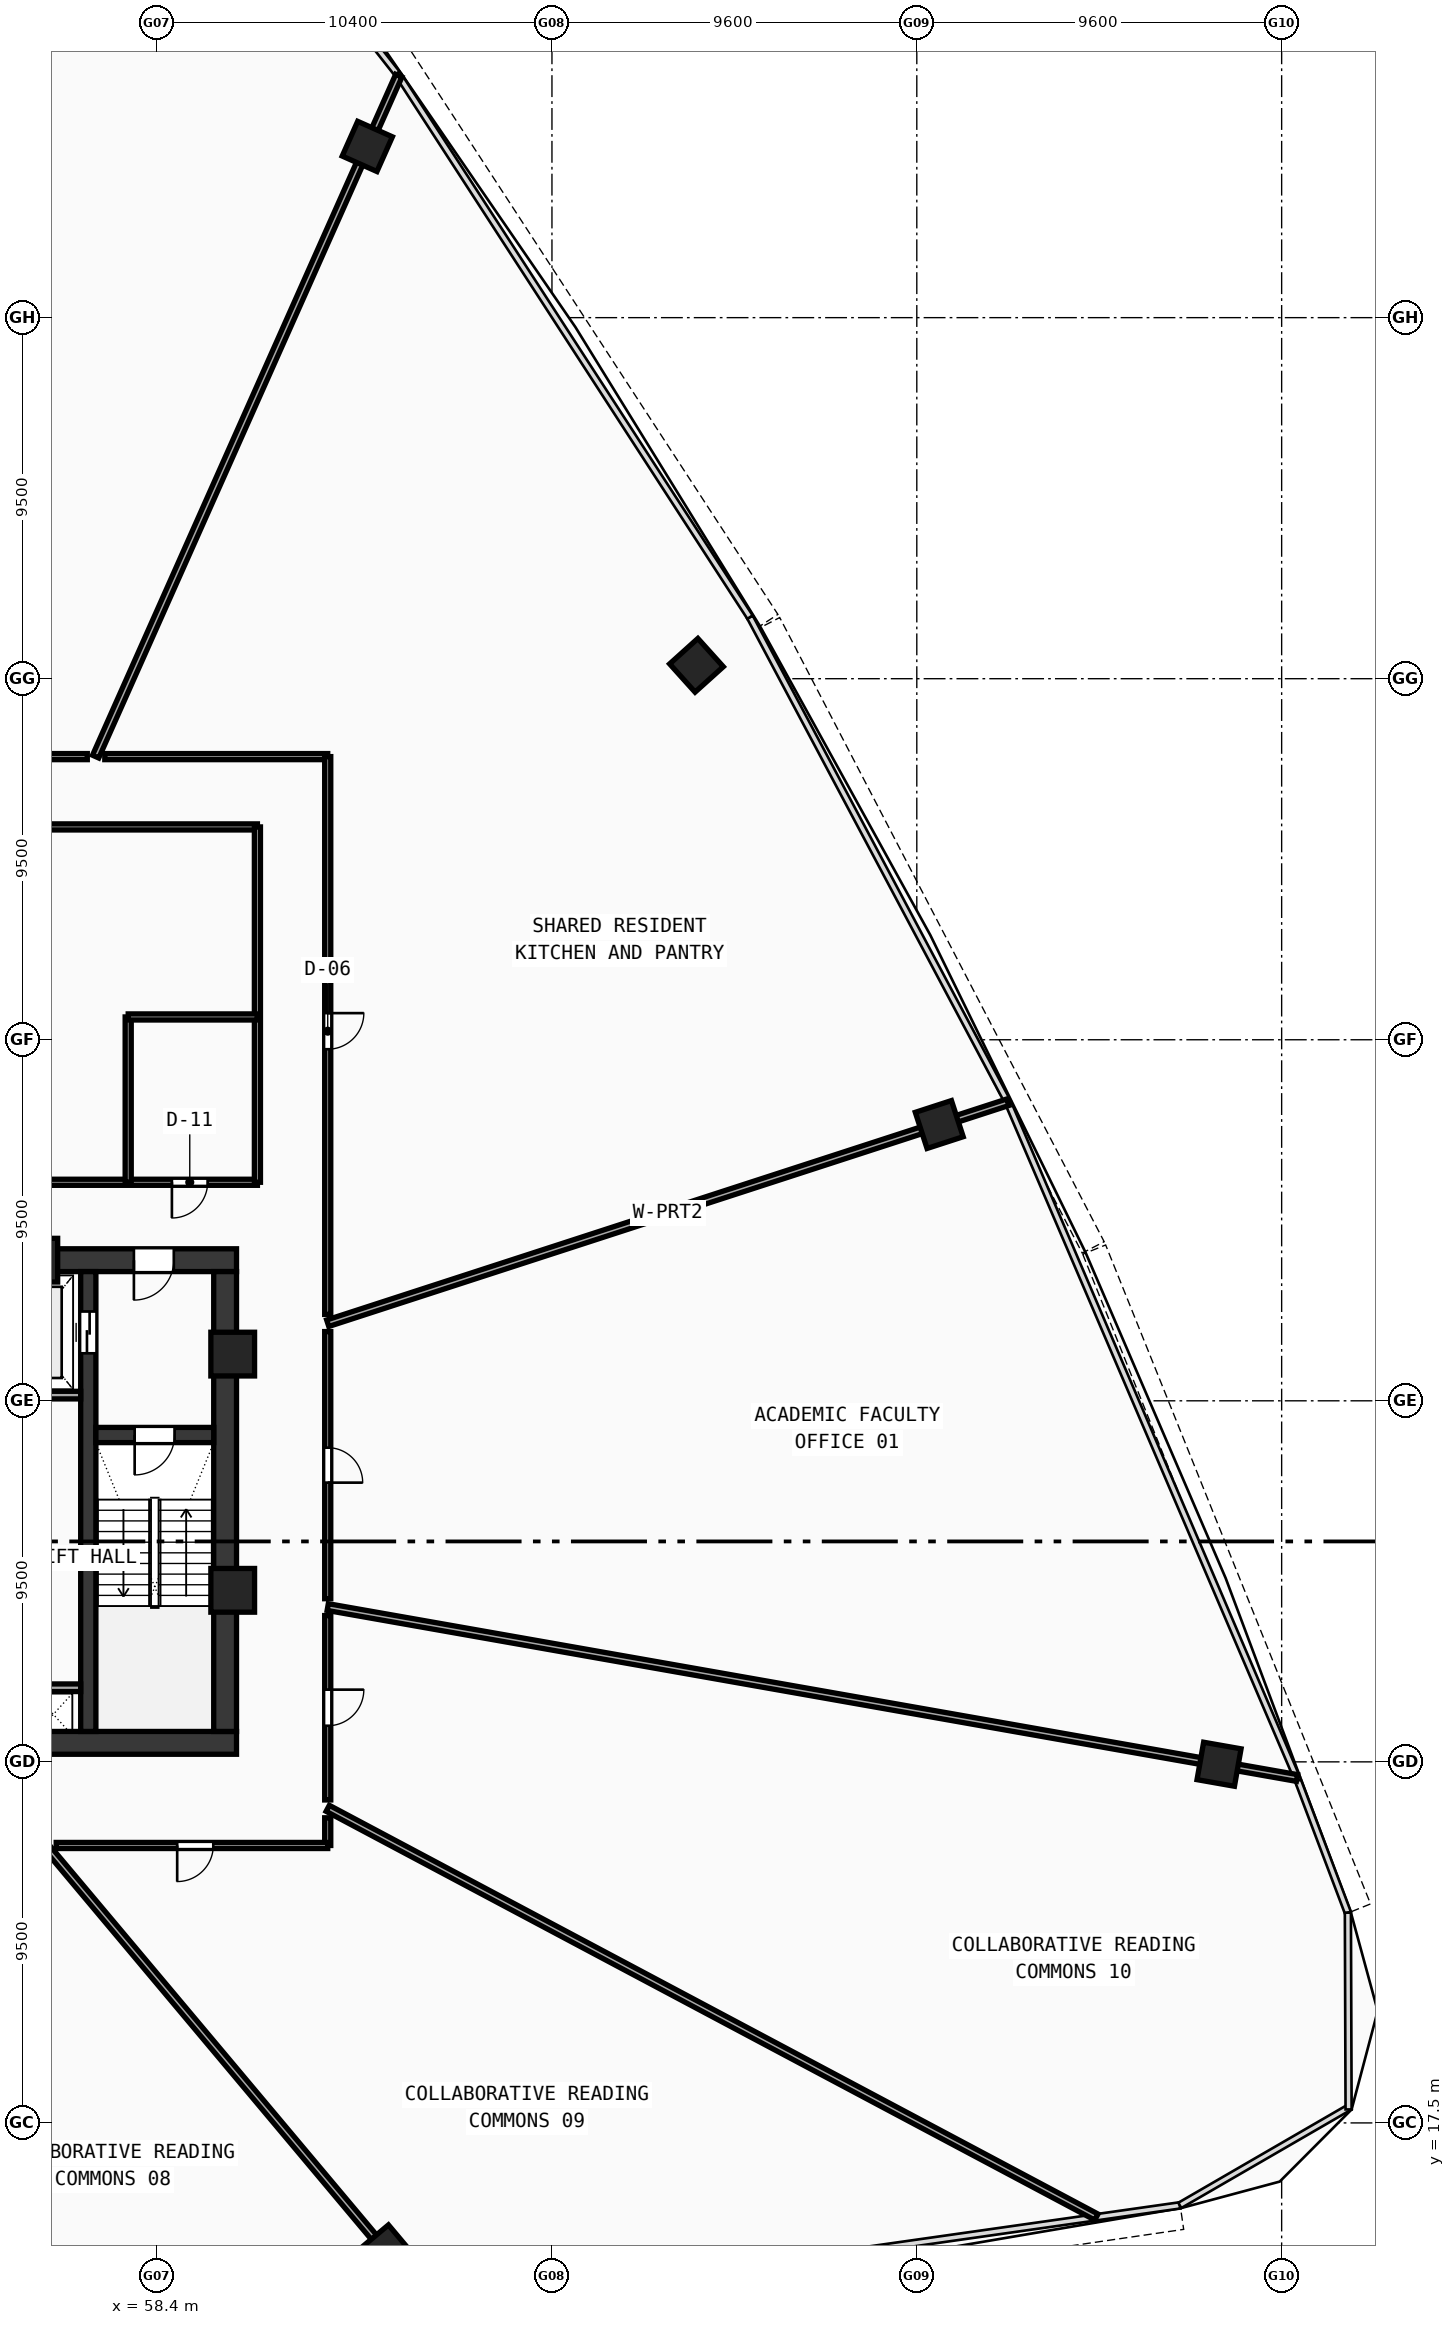
"""IFC4 building model, lengths in metres.
Left out: names, types, materials, properties, quantities, classifications, styles, units other than length and angle.
Written with IfcOpenShell. Run it as: python <this file> out.ifc"""

import sys

from ifc_helpers import new_model, si_unit, direction, frame, frame_2d, origin, origin_with_axes, origin_2d, place, context, subcontext, project, spatial, rectangle, hollow_rectangle, extrude, source, transform, mapped, element, fill, save


model = new_model("IFC4")
c1 = context("Model", 3, precision=1e-05, world=origin(), true_north=direction((0.0, 1.0)))
c2 = subcontext(c1, "Body", "Model", "MODEL_VIEW")
j1 = project(units=[si_unit("LENGTHUNIT", "METRE"), si_unit("PLANEANGLEUNIT", "RADIAN")], contexts=[c1])
p1 = place(None, origin())
s1 = spatial("IfcSite", under=j1, at=p1, CompositionType="ELEMENT")
p2 = place(p1, origin())
s2 = spatial("IfcBuilding", under=s1, at=p2, CompositionType="ELEMENT")
p3 = place(p2, frame((0.0, 0.0, 100.18)))
s3 = spatial("IfcBuildingStorey", under=s2, at=p3, CompositionType="ELEMENT", Elevation=100.18)
p4 = place(p3, frame((35.5, 27.5, 0.0), z_axis=(0.0, 0.0, 1.0), x_axis=(1.0, 0.0, 0.0)))
e1 = element("IfcWall", 1, at=p4, inside=s3, PredefinedType="SHEAR", context=c2, shape_type="SweptSolid", body=[
    extrude(rectangle(XDim=25.0, YDim=0.6, at=frame_2d((12.5, 0.0))), origin(), (0.0, 0.0, 1.0), 3.54),
])
p5 = place(p3, frame((49.2, 40.2, 0.0), z_axis=(0.0, 0.0, 1.0), x_axis=(1.0, 0.0, 0.0)))
e2 = element("IfcWall", 2, at=p5, inside=s3, PredefinedType="SHEAR", context=c2, shape_type="SweptSolid", body=[
    extrude(rectangle(XDim=11.3, YDim=0.6, at=frame_2d((5.65, 0.0))), origin(), (0.0, 0.0, 1.0), 3.54),
])
p6 = place(p5, frame((8.6, 0.0, 0.0)))
e3 = element("IfcOpeningElement", 3, at=p6, cuts=e2, PredefinedType="OPENING", context=c2, shape_type="SweptSolid", body=[
    extrude(rectangle(XDim=1.05, YDim=2.1, at=frame_2d((0.525, 1.05))), frame((0.0, 0.31, 0.0), z_axis=(0.0, -1.0, 0.0), x_axis=(1.0, 0.0, 0.0)), (0.0, 0.0, 1.0), 0.62),
])
p7 = place(p3, frame((60.2, 27.8, 0.0), z_axis=(0.0, 0.0, 1.0), x_axis=(0.0, 1.0, 0.0)))
e4 = element("IfcWall", 4, at=p7, inside=s3, PredefinedType="SHEAR", context=c2, shape_type="SweptSolid", body=[
    extrude(rectangle(XDim=12.1, YDim=0.6, at=frame_2d((6.05, 0.0))), origin(), (0.0, 0.0, 1.0), 3.54),
])
p8 = place(p3, frame((56.6, 27.8, 0.0), z_axis=(0.0, 0.0, 1.0), x_axis=(0.0, 1.0, 0.0)))
e5 = element("IfcWall", 5, at=p8, inside=s3, PredefinedType="SHEAR", context=c2, shape_type="SweptSolid", body=[
    extrude(rectangle(XDim=12.1, YDim=0.4, at=frame_2d((6.05, 0.0))), origin(), (0.0, 0.0, 1.0), 3.54),
])
p9 = place(p8, frame((9.95, 0.0, 0.0)))
e6 = element("IfcOpeningElement", 6, at=p9, cuts=e5, PredefinedType="OPENING", context=c2, shape_type="SweptSolid", body=[
    extrude(rectangle(XDim=1.1, YDim=2.1, at=frame_2d((0.55, 1.05))), frame((0.0, 0.21, 0.0), z_axis=(0.0, -1.0, 0.0), x_axis=(1.0, 0.0, 0.0)), (0.0, 0.0, 1.0), 0.42),
])
p10 = place(p3, frame((56.8, 35.6, 0.0), z_axis=(0.0, 0.0, 1.0), x_axis=(1.0, 0.0, 0.0)))
e7 = element("IfcWall", 7, at=p10, inside=s3, PredefinedType="SHEAR", context=c2, shape_type="SweptSolid", body=[
    extrude(rectangle(XDim=3.1, YDim=0.4, at=frame_2d((1.55, 0.0))), origin(), (0.0, 0.0, 1.0), 3.54),
])
p11 = place(p10, frame((1.02, 0.0, 0.0)))
e8 = element("IfcOpeningElement", 8, at=p11, cuts=e7, PredefinedType="OPENING", context=c2, shape_type="SweptSolid", body=[
    extrude(rectangle(XDim=1.05, YDim=2.1, at=frame_2d((0.525, 1.05))), frame((0.0, 0.21, 0.0), z_axis=(0.0, -1.0, 0.0), x_axis=(1.0, 0.0, 0.0)), (0.0, 0.0, 1.0), 0.42),
])
m1 = source(origin(), c2, "Body", "SweptSolid", [
    extrude(hollow_rectangle(XDim=1.15, YDim=1.15, WallThickness=0.048, at=origin_2d()), origin(), (0.0, 0.0, 1.0), 3.8),
])
for number, where, z_axis, x_axis in (
    (9, (60.4, 31.513, -0.26), (0.0, 0.0, 1.0), (1.0, 0.0, 0.0)),
    (10, (60.4, 37.729, -0.26), (0.0, 0.0, 1.0), (1.0, 0.0, 0.0)),
    (11, (55.219, 40.2, -0.26), (0.0, 0.0, 1.0), (1.0, 0.0, 0.0)),
):
    element("IfcColumn", number, at=place(p3, frame(where, z_axis=z_axis, x_axis=x_axis)), inside=s3, PredefinedType="COLUMN", context=c2, shape_type="MappedRepresentation", body=[
        mapped(m1, transform((0.0, 0.0, 0.0), scale=1.0)),
    ])
m2 = source(origin(), c2, "Body", "SweptSolid", [
    extrude(hollow_rectangle(XDim=1.0, YDim=1.0, WallThickness=0.042, at=origin_2d()), origin(), (0.0, 0.0, 1.0), 3.8),
])
for number, where, z_axis, x_axis in (
    (12, (64.436, 14.112, -0.26), (0.0, 0.0, 1.0), (0.766, 0.643, 0.0)),
    (13, (86.353, 26.938, -0.26), (0.0, 0.0, 1.0), (0.174, 0.985, 0.0)),
    (14, (78.991, 43.77, -0.26), (0.0, 0.0, 1.0), (-0.309, 0.951, 0.0)),
    (15, (72.603, 55.852, -0.26), (0.0, 0.0, 1.0), (-0.669, 0.743, 0.0)),
    (16, (63.941, 69.505, -0.26), (0.0, 0.0, 1.0), (-0.914, 0.407, 0.0)),
):
    element("IfcColumn", number, at=place(p3, frame(where, z_axis=z_axis, x_axis=x_axis)), inside=s3, PredefinedType="COLUMN", context=c2, shape_type="MappedRepresentation", body=[
        mapped(m2, transform((0.0, 0.0, 0.0), scale=1.0)),
    ])
p12 = place(p3, frame((53.68, 36.65, 0.0), z_axis=(0.0, 0.0, 1.0), x_axis=(1.0, 0.0, 0.0)))
e17 = element("IfcWall", 17, at=p12, inside=s3, PredefinedType="SOLIDWALL", context=c2, shape_type="SweptSolid", body=[
    extrude(rectangle(XDim=2.72, YDim=0.2, at=frame_2d((1.36, 0.0))), origin(), (0.0, 0.0, 1.0), 3.54),
])
p13 = place(p3, frame((55.12, 28.95, 0.0), z_axis=(0.0, 0.0, 1.0), x_axis=(1.0, 0.0, 0.0)))
e18 = element("IfcWall", 18, at=p13, inside=s3, PredefinedType="SOLIDWALL", context=c2, shape_type="SweptSolid", body=[
    extrude(rectangle(XDim=1.28, YDim=0.2, at=frame_2d((0.64, 0.0))), origin(), (0.0, 0.0, 1.0), 3.54),
])
p14 = place(p3, frame((45.92, 42.25, 0.0), z_axis=(0.0, 0.0, 1.0), x_axis=(1.0, 0.0, 0.0)))
e19 = element("IfcWall", 19, at=p14, inside=s3, PredefinedType="PARTITIONING", context=c2, shape_type="SweptSolid", body=[
    extrude(rectangle(XDim=15.13, YDim=0.16, at=frame_2d((7.565, 0.0))), origin(), (0.0, 0.0, 1.0), 2.84),
])
p15 = place(p14, frame((2.1, 0.0, 0.0)))
e20 = element("IfcOpeningElement", 20, at=p15, cuts=e19, PredefinedType="OPENING", context=c2, shape_type="SweptSolid", body=[
    extrude(rectangle(XDim=0.92, YDim=2.1, at=frame_2d((0.46, 1.05))), frame((0.0, 0.09, 0.0), z_axis=(0.0, -1.0, 0.0), x_axis=(1.0, 0.0, 0.0)), (0.0, 0.0, 1.0), 0.18),
])
p16 = place(p14, frame((12.88, 0.0, 0.0)))
e21 = element("IfcOpeningElement", 21, at=p16, cuts=e19, PredefinedType="OPENING", context=c2, shape_type="SweptSolid", body=[
    extrude(rectangle(XDim=0.94, YDim=2.1, at=frame_2d((0.47, 1.05))), frame((0.0, 0.09, 0.0), z_axis=(0.0, -1.0, 0.0), x_axis=(1.0, 0.0, 0.0)), (0.0, 0.0, 1.0), 0.18),
])
p17 = place(p3, frame((45.92, 51.6, 0.0), z_axis=(0.0, 0.0, 1.0), x_axis=(1.0, 0.0, 0.0)))
e22 = element("IfcWall", 22, at=p17, inside=s3, PredefinedType="PARTITIONING", context=c2, shape_type="SweptSolid", body=[
    extrude(rectangle(XDim=15.13, YDim=0.16, at=frame_2d((7.565, 0.0))), origin(), (0.0, 0.0, 1.0), 2.84),
])
p18 = place(p3, frame((61.05, 42.25, 0.0), z_axis=(0.0, 0.0, 1.0), x_axis=(0.0, 1.0, 0.0)))
e23 = element("IfcWall", 23, at=p18, inside=s3, PredefinedType="PARTITIONING", context=c2, shape_type="SweptSolid", body=[
    extrude(rectangle(XDim=9.35, YDim=0.16, at=frame_2d((4.675, 0.0))), origin(), (0.0, 0.0, 1.0), 2.84),
])
p19 = place(p3, frame((57.65, 42.25, 0.0), z_axis=(0.0, 0.0, 1.0), x_axis=(0.0, 1.0, 0.0)))
e24 = element("IfcWall", 24, at=p19, inside=s3, PredefinedType="PARTITIONING", context=c2, shape_type="SweptSolid", body=[
    extrude(rectangle(XDim=4.35, YDim=0.16, at=frame_2d((2.175, 0.0))), origin(), (0.0, 0.0, 1.0), 2.84),
])
p20 = place(p3, frame((57.65, 46.6, 0.0), z_axis=(0.0, 0.0, 1.0), x_axis=(1.0, 0.0, 0.0)))
e25 = element("IfcWall", 25, at=p20, inside=s3, PredefinedType="PARTITIONING", context=c2, shape_type="SweptSolid", body=[
    extrude(rectangle(XDim=3.4, YDim=0.16, at=frame_2d((1.7, 0.0))), origin(), (0.0, 0.0, 1.0), 3.14),
])
p21 = place(p3, frame((62.9, 38.541, 0.0), z_axis=(0.0, 0.0, 1.0), x_axis=(0.951056186137, 0.309018010496, 0.0)))
e26 = element("IfcWall", 26, at=p21, inside=s3, PredefinedType="PARTITIONING", context=c2, shape_type="SweptSolid", body=[
    extrude(rectangle(XDim=18.817, YDim=0.18, at=frame_2d((9.409, 0.0))), origin(), (0.0, 0.0, 1.0), 2.84),
])
p22 = place(p3, frame((56.793, 53.45, 0.0), z_axis=(0.0, 0.0, 1.0), x_axis=(0.406741294252, 0.913543386791, 0.0)))
e27 = element("IfcWall", 27, at=p22, inside=s3, PredefinedType="PARTITIONING", context=c2, shape_type="SweptSolid", body=[
    extrude(rectangle(XDim=19.612, YDim=0.18, at=frame_2d((9.806, 0.0))), origin(), (0.0, 0.0, 1.0), 2.84),
])
p23 = place(p3, frame((55.468, 24.8, 0.0), z_axis=(0.0, 0.0, 1.0), x_axis=(0.642790007557, -0.766042431061, 0.0)))
e28 = element("IfcWall", 28, at=p23, inside=s3, PredefinedType="PARTITIONING", context=c2, shape_type="SweptSolid", body=[
    extrude(rectangle(XDim=15.995, YDim=0.18, at=frame_2d((7.998, 0.0))), origin(), (0.0, 0.0, 1.0), 2.84),
])
p24 = place(p3, frame((62.9, 25.778, 0.0), z_axis=(0.0, 0.0, 1.0), x_axis=(0.882949939944, -0.469467148533, 0.0)))
e29 = element("IfcWall", 29, at=p24, inside=s3, PredefinedType="PARTITIONING", context=c2, shape_type="SweptSolid", body=[
    extrude(rectangle(XDim=22.908, YDim=0.18, at=frame_2d((11.454, 0.0))), origin(), (0.0, 0.0, 1.0), 2.84),
])
p25 = place(p3, frame((62.9, 31.073, 0.0), z_axis=(0.0, 0.0, 1.0), x_axis=(0.984807465584, -0.173649807743, 0.0)))
e30 = element("IfcWall", 30, at=p25, inside=s3, PredefinedType="PARTITIONING", context=c2, shape_type="SweptSolid", body=[
    extrude(rectangle(XDim=25.897, YDim=0.18, at=frame_2d((12.949, 0.0))), origin(), (0.0, 0.0, 1.0), 2.84),
])
p26 = place(p3, frame((45.85, 53.45, 0.0), z_axis=(0.0, 0.0, 1.0), x_axis=(1.0, 0.0, 0.0)))
e31 = element("IfcWall", 31, at=p26, inside=s3, PredefinedType="PARTITIONING", context=c2, shape_type="SweptSolid", body=[
    extrude(rectangle(XDim=10.723, YDim=0.16, at=frame_2d((5.362, 0.0))), origin(), (0.0, 0.0, 1.0), 2.84),
])
p27 = place(p26, frame((4.781, 0.0, 0.0)))
e32 = element("IfcOpeningElement", 32, at=p27, cuts=e31, PredefinedType="OPENING", context=c2, shape_type="SweptSolid", body=[
    extrude(rectangle(XDim=0.92, YDim=2.1, at=frame_2d((0.46, 1.05))), frame((0.0, 0.09, 0.0), z_axis=(0.0, -1.0, 0.0), x_axis=(1.0, 0.0, 0.0)), (0.0, 0.0, 1.0), 0.18),
])
p28 = place(p3, frame((57.034, 53.45, 0.0), z_axis=(0.0, 0.0, 1.0), x_axis=(1.0, 0.0, 0.0)))
e33 = element("IfcWall", 33, at=p28, inside=s3, PredefinedType="PARTITIONING", context=c2, shape_type="SweptSolid", body=[
    extrude(rectangle(XDim=5.866, YDim=0.16, at=frame_2d((2.933, 0.0))), origin(), (0.0, 0.0, 1.0), 3.54),
])
p29 = place(p3, frame((62.9, 53.45, 0.0), z_axis=(0.0, 0.0, 1.0), x_axis=(0.0, -1.0, 0.0)))
e34 = element("IfcWall", 34, at=p29, inside=s3, PredefinedType="PARTITIONING", context=c2, shape_type="SweptSolid", body=[
    extrude(rectangle(XDim=14.677, YDim=0.16, at=frame_2d((7.339, 0.0))), origin(), (0.0, 0.0, 1.0), 2.84),
])
p30 = place(p29, frame((6.75, 0.0, 0.0)))
e35 = element("IfcOpeningElement", 35, at=p30, cuts=e34, PredefinedType="OPENING", context=c2, shape_type="SweptSolid", body=[
    extrude(rectangle(XDim=0.95, YDim=2.1, at=frame_2d((0.475, 1.05))), frame((0.0, 0.09, 0.0), z_axis=(0.0, -1.0, 0.0), x_axis=(1.0, 0.0, 0.0)), (0.0, 0.0, 1.0), 0.18),
])
p31 = place(p3, frame((62.9, 38.322, 0.0), z_axis=(0.0, 0.0, 1.0), x_axis=(0.0, -1.0, 0.0)))
e36 = element("IfcWall", 36, at=p31, inside=s3, PredefinedType="PARTITIONING", context=c2, shape_type="SweptSolid", body=[
    extrude(rectangle(XDim=7.029, YDim=0.16, at=frame_2d((3.515, 0.0))), origin(), (0.0, 0.0, 1.0), 3.54),
])
p32 = place(p31, frame((3.054, 0.0, 0.0)))
e37 = element("IfcOpeningElement", 37, at=p32, cuts=e36, PredefinedType="OPENING", context=c2, shape_type="SweptSolid", body=[
    extrude(rectangle(XDim=0.92, YDim=2.1, at=frame_2d((0.46, 1.05))), frame((0.0, 0.09, 0.0), z_axis=(0.0, -1.0, 0.0), x_axis=(1.0, 0.0, 0.0)), (0.0, 0.0, 1.0), 0.18),
])
p33 = place(p3, frame((62.9, 30.849, 0.0), z_axis=(0.0, 0.0, 1.0), x_axis=(0.0, -1.0, 0.0)))
e38 = element("IfcWall", 38, at=p33, inside=s3, PredefinedType="PARTITIONING", context=c2, shape_type="SweptSolid", body=[
    extrude(rectangle(XDim=4.852, YDim=0.16, at=frame_2d((2.426, 0.0))), origin(), (0.0, 0.0, 1.0), 3.54),
])
p34 = place(p33, frame((1.949, 0.0, 0.0)))
e39 = element("IfcOpeningElement", 39, at=p34, cuts=e38, PredefinedType="OPENING", context=c2, shape_type="SweptSolid", body=[
    extrude(rectangle(XDim=0.95, YDim=2.1, at=frame_2d((0.475, 1.05))), frame((0.0, 0.09, 0.0), z_axis=(0.0, -1.0, 0.0), x_axis=(1.0, 0.0, 0.0)), (0.0, 0.0, 1.0), 0.18),
])
p35 = place(p3, frame((62.9, 25.528, 0.0), z_axis=(0.0, 0.0, 1.0), x_axis=(0.0, -1.0, 0.0)))
e40 = element("IfcWall", 40, at=p35, inside=s3, PredefinedType="PARTITIONING", context=c2, shape_type="SweptSolid", body=[
    extrude(rectangle(XDim=0.728, YDim=0.16, at=frame_2d((0.364, 0.0))), origin(), (0.0, 0.0, 1.0), 3.54),
])
p36 = place(p3, frame((62.9, 24.8, 0.0), z_axis=(0.0, 0.0, 1.0), x_axis=(-1.0, 0.0, 0.0)))
e41 = element("IfcWall", 41, at=p36, inside=s3, PredefinedType="PARTITIONING", context=c2, shape_type="SweptSolid", body=[
    extrude(rectangle(XDim=7.145, YDim=0.16, at=frame_2d((3.572, 0.0))), origin(), (0.0, 0.0, 1.0), 3.14),
])
p37 = place(p36, frame((3.011, 0.0, 0.0)))
e42 = element("IfcOpeningElement", 42, at=p37, cuts=e41, PredefinedType="OPENING", context=c2, shape_type="SweptSolid", body=[
    extrude(rectangle(XDim=0.95, YDim=2.1, at=frame_2d((0.475, 1.05))), frame((0.0, 0.09, 0.0), z_axis=(0.0, -1.0, 0.0), x_axis=(1.0, 0.0, 0.0)), (0.0, 0.0, 1.0), 0.18),
])
m3 = source(origin(), c2, "Body", "SweptSolid", [
    extrude(rectangle(XDim=1.05, YDim=2.1, at=frame_2d((0.525, 1.05))), frame((0.0, 0.025, 0.0), z_axis=(0.0, -1.0, 0.0), x_axis=(1.0, 0.0, 0.0)), (0.0, 0.0, 1.0), 0.05),
])
p38 = place(p11, frame((1.05, 0.0, 0.0), z_axis=(0.0, 0.0, 1.0), x_axis=(-1.0, 0.0, 0.0)))
e43 = element("IfcDoor", 43, at=p38, inside=s3, OperationType="SINGLE_SWING_RIGHT", PredefinedType="DOOR", context=c2, shape_type="MappedRepresentation", body=[
    mapped(m3, transform((0.0, 0.0, 0.0), scale=1.0)),
])
fill(e8, e43)
p39 = place(p6, frame((1.05, 0.0, 0.0), z_axis=(0.0, 0.0, 1.0), x_axis=(-1.0, 0.0, 0.0)))
e44 = element("IfcDoor", 44, at=p39, inside=s3, OperationType="SINGLE_SWING_RIGHT", PredefinedType="DOOR", context=c2, shape_type="MappedRepresentation", body=[
    mapped(m3, transform((0.0, 0.0, 0.0), scale=1.0)),
])
fill(e3, e44)
m4 = source(origin(), c2, "Body", "SweptSolid", [
    extrude(rectangle(XDim=1.1, YDim=2.1, at=frame_2d((0.55, 1.05))), frame((0.0, 0.025, 0.0), z_axis=(0.0, -1.0, 0.0), x_axis=(1.0, 0.0, 0.0)), (0.0, 0.0, 1.0), 0.05),
])
p40 = place(p9, origin_with_axes())
e45 = element("IfcDoor", 45, at=p40, inside=s3, OperationType="DOUBLE_DOOR_SLIDING", PredefinedType="DOOR", context=c2, shape_type="MappedRepresentation", body=[
    mapped(m4, transform((0.0, 0.0, 0.0), scale=1.0)),
])
fill(e6, e45)
m5 = source(origin(), c2, "Body", "SweptSolid", [
    extrude(rectangle(XDim=0.94, YDim=2.1, at=frame_2d((0.47, 1.05))), frame((0.0, 0.025, 0.0), z_axis=(0.0, -1.0, 0.0), x_axis=(1.0, 0.0, 0.0)), (0.0, 0.0, 1.0), 0.05),
])
p41 = place(p16, frame((0.94, 0.0, 0.0), z_axis=(0.0, 0.0, 1.0), x_axis=(-1.0, 0.0, 0.0)))
e46 = element("IfcDoor", 46, at=p41, inside=s3, OperationType="SINGLE_SWING_RIGHT", PredefinedType="DOOR", context=c2, shape_type="MappedRepresentation", body=[
    mapped(m5, transform((0.0, 0.0, 0.0), scale=1.0)),
])
fill(e21, e46)
m6 = source(origin(), c2, "Body", "SweptSolid", [
    extrude(rectangle(XDim=0.92, YDim=2.1, at=frame_2d((0.46, 1.05))), frame((0.0, 0.025, 0.0), z_axis=(0.0, -1.0, 0.0), x_axis=(1.0, 0.0, 0.0)), (0.0, 0.0, 1.0), 0.05),
])
p42 = place(p32, origin_with_axes())
e47 = element("IfcDoor", 47, at=p42, inside=s3, OperationType="SINGLE_SWING_RIGHT", PredefinedType="DOOR", context=c2, shape_type="MappedRepresentation", body=[
    mapped(m6, transform((0.0, 0.0, 0.0), scale=1.0)),
])
fill(e37, e47)
m7 = source(origin(), c2, "Body", "SweptSolid", [
    extrude(rectangle(XDim=0.95, YDim=2.1, at=frame_2d((0.475, 1.05))), frame((0.0, 0.025, 0.0), z_axis=(0.0, -1.0, 0.0), x_axis=(1.0, 0.0, 0.0)), (0.0, 0.0, 1.0), 0.05),
])
p43 = place(p30, origin_with_axes())
e48 = element("IfcDoor", 48, at=p43, inside=s3, OperationType="SINGLE_SWING_LEFT", PredefinedType="DOOR", context=c2, shape_type="MappedRepresentation", body=[
    mapped(m7, transform((0.0, 0.0, 0.0), scale=1.0)),
])
fill(e35, e48)
p44 = place(p37, origin_with_axes())
e49 = element("IfcDoor", 49, at=p44, inside=s3, OperationType="SINGLE_SWING_RIGHT", PredefinedType="DOOR", context=c2, shape_type="MappedRepresentation", body=[
    mapped(m7, transform((0.0, 0.0, 0.0), scale=1.0)),
])
fill(e42, e49)
p45 = place(p34, origin_with_axes())
e50 = element("IfcDoor", 50, at=p45, inside=s3, OperationType="SINGLE_SWING_LEFT", PredefinedType="DOOR", context=c2, shape_type="MappedRepresentation", body=[
    mapped(m7, transform((0.0, 0.0, 0.0), scale=1.0)),
])
fill(e39, e50)
save(model, sys.argv[1])
